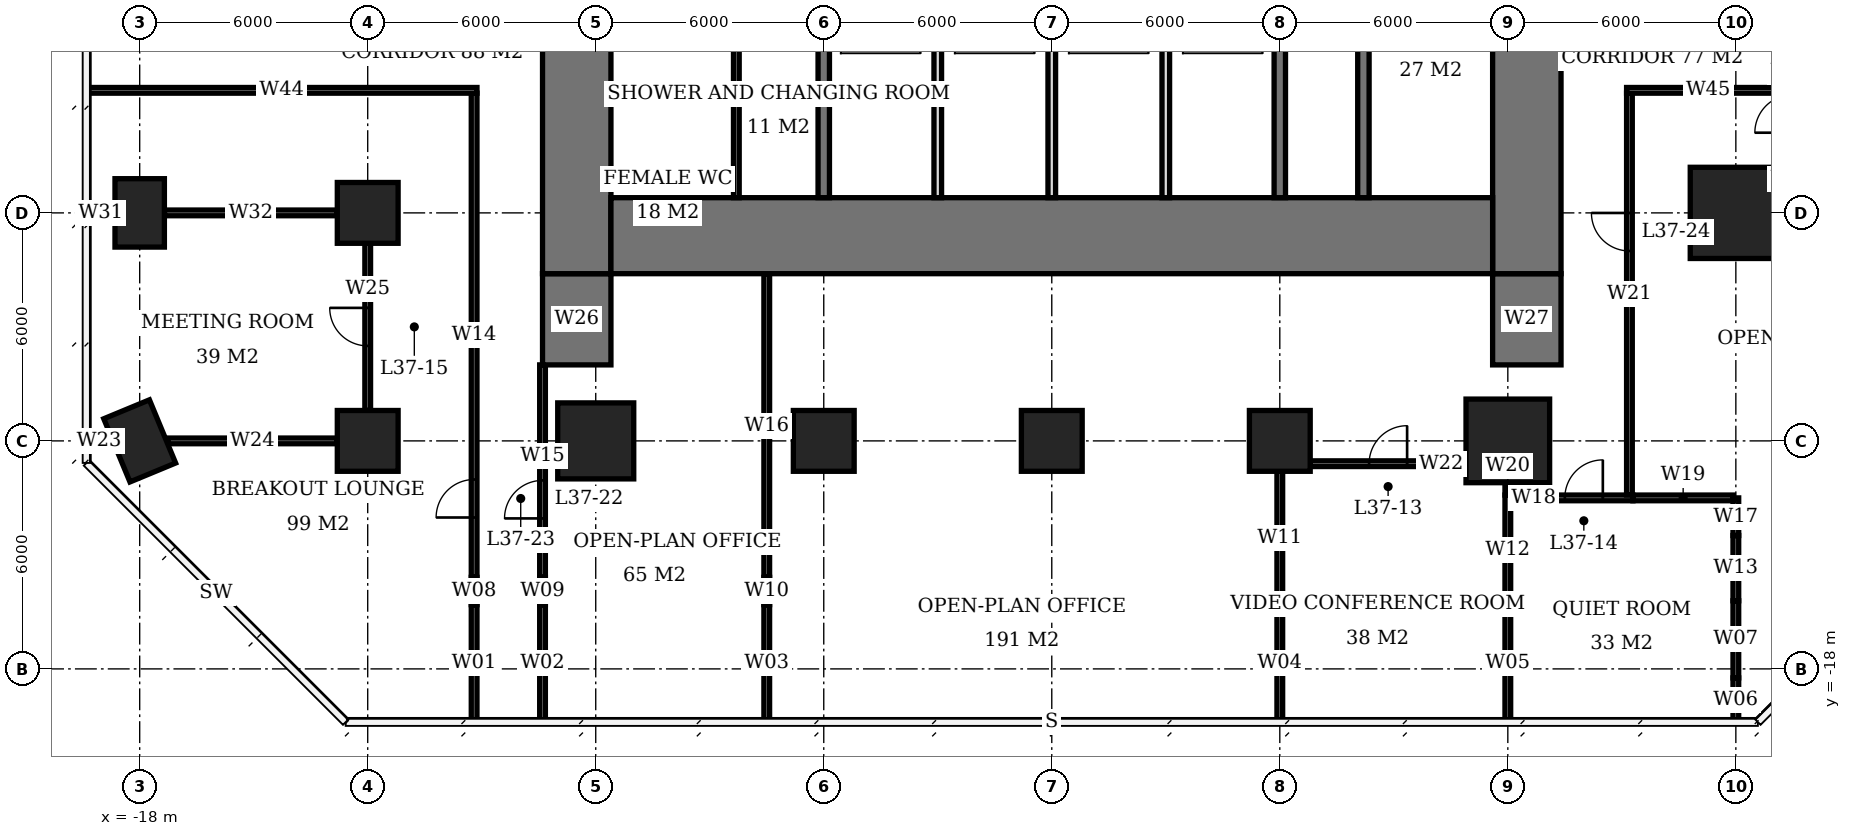
"""IFC4 building model, lengths in metres.
Left out: names, types, materials, properties, quantities, classifications, styles, units other than length and angle.
Written with IfcOpenShell. Run it as: python <this file> out.ifc"""

import sys

from ifc_helpers import new_model, si_unit, direction, frame, frame_2d, origin, origin_2d, place, context, subcontext, project, spatial, rectangle, extrude, element, fill, save


model = new_model("IFC4")
c1 = context("Model", 3, precision=1e-05, world=origin(), true_north=direction((0.0, 1.0)))
c2 = subcontext(c1, "Body", "Model", "MODEL_VIEW")
j1 = project(units=[si_unit("LENGTHUNIT", "METRE"), si_unit("PLANEANGLEUNIT", "RADIAN")], contexts=[c1])
p1 = place(None, origin())
s1 = spatial("IfcSite", under=j1, at=p1, CompositionType="ELEMENT")
p2 = place(p1, origin())
s2 = spatial("IfcBuilding", under=s1, at=p2, CompositionType="ELEMENT")
p3 = place(p2, frame((0.0, 0.0, 152.3)))
s3 = spatial("IfcBuildingStorey", under=s2, at=p3, CompositionType="ELEMENT", Elevation=152.3)
for number, where, z_axis, x_axis in (
    (1, (-18.0, -12.0, 0.0), (0.0, 0.0, 1.0), (-0.383, 0.924, 0.0)),
    (2, (-18.0, -6.0, 0.0), (0.0, 0.0, 1.0), (0.0, 1.0, 0.0)),
):
    element("IfcColumn", number, at=place(p3, frame(where, z_axis=z_axis, x_axis=x_axis)), inside=s3, PredefinedType="COLUMN", context=c2, shape_type="SweptSolid", body=[
        extrude(rectangle(XDim=1.8, YDim=1.3, at=origin_2d()), origin(), (0.0, 0.0, 1.0), 3.9),
    ])
for number, where, z_axis, x_axis in (
    (3, (-12.0, -12.0, 0.0), (0.0, 0.0, 1.0), (1.0, 0.0, 0.0)),
    (4, (-12.0, -6.0, 0.0), (0.0, 0.0, 1.0), (1.0, 0.0, 0.0)),
):
    element("IfcColumn", number, at=place(p3, frame(where, z_axis=z_axis, x_axis=x_axis)), inside=s3, PredefinedType="COLUMN", context=c2, shape_type="SweptSolid", body=[
        extrude(rectangle(XDim=1.6, YDim=1.6, at=origin_2d()), origin(), (0.0, 0.0, 1.0), 3.9),
    ])
p4 = place(p3, frame((-6.0, -12.0, 0.0), z_axis=(0.0, 0.0, 1.0), x_axis=(1.0, 0.0, 0.0)))
e5 = element("IfcColumn", 5, at=p4, inside=s3, PredefinedType="COLUMN", context=c2, shape_type="SweptSolid", body=[
    extrude(rectangle(XDim=2.0, YDim=2.0, at=origin_2d()), origin(), (0.0, 0.0, 1.0), 3.9),
])
for number, where, z_axis, x_axis in (
    (6, (0.0, -12.0, 0.0), (0.0, 0.0, 1.0), (1.0, 0.0, 0.0)),
    (7, (6.0, -12.0, 0.0), (0.0, 0.0, 1.0), (1.0, 0.0, 0.0)),
    (8, (12.0, -12.0, 0.0), (0.0, 0.0, 1.0), (1.0, 0.0, 0.0)),
):
    element("IfcColumn", number, at=place(p3, frame(where, z_axis=z_axis, x_axis=x_axis)), inside=s3, PredefinedType="COLUMN", context=c2, shape_type="SweptSolid", body=[
        extrude(rectangle(XDim=1.6, YDim=1.6, at=origin_2d()), origin(), (0.0, 0.0, 1.0), 3.9),
    ])
p5 = place(p3, frame((18.0, -12.0, 0.0), z_axis=(0.0, 0.0, 1.0), x_axis=(1.0, 0.0, 0.0)))
e9 = element("IfcColumn", 9, at=p5, inside=s3, PredefinedType="COLUMN", context=c2, shape_type="SweptSolid", body=[
    extrude(rectangle(XDim=2.2, YDim=2.2, at=origin_2d()), origin(), (0.0, 0.0, 1.0), 3.9),
])
p6 = place(p3, frame((24.0, -6.0, 0.0), z_axis=(0.0, 0.0, 1.0), x_axis=(1.0, 0.0, 0.0)))
e10 = element("IfcColumn", 10, at=p6, inside=s3, PredefinedType="COLUMN", context=c2, shape_type="SweptSolid", body=[
    extrude(rectangle(XDim=2.4, YDim=2.4, at=origin_2d()), origin(), (0.0, 0.0, 1.0), 3.9),
])
p7 = place(p3, frame((-5.6, -6.6, 0.0), z_axis=(0.0, 0.0, 1.0), x_axis=(1.0, 0.0, 0.0)))
e11 = element("IfcWall", 11, at=p7, inside=s3, PredefinedType="SHEAR", context=c2, shape_type="SweptSolid", body=[
    extrude(rectangle(XDim=23.2, YDim=2.0, at=frame_2d((11.6, 0.0))), origin(), (0.0, 0.0, 1.0), 3.9),
])
p8 = place(p3, frame((-6.5, -7.6, 0.0), z_axis=(0.0, 0.0, 1.0), x_axis=(0.0, 1.0, 0.0)))
e12 = element("IfcWall", 12, at=p8, inside=s3, PredefinedType="SHEAR", context=c2, shape_type="SweptSolid", body=[
    extrude(rectangle(XDim=21.2, YDim=1.8, at=frame_2d((10.6, 0.0))), origin(), (0.0, 0.0, 1.0), 3.9),
])
p9 = place(p8, frame((7.8, 0.0, 0.0)))
e13 = element("IfcOpeningElement", 13, at=p9, cuts=e12, PredefinedType="OPENING", context=c2, shape_type="SweptSolid", body=[
    extrude(rectangle(XDim=1.8, YDim=2.4, at=frame_2d((0.9, 1.2))), frame((0.0, 0.91, 0.0), z_axis=(0.0, -1.0, 0.0), x_axis=(1.0, 0.0, 0.0)), (0.0, 0.0, 1.0), 1.82),
])
p10 = place(p3, frame((18.5, -7.6, 0.0), z_axis=(0.0, 0.0, 1.0), x_axis=(0.0, 1.0, 0.0)))
e14 = element("IfcWall", 14, at=p10, inside=s3, PredefinedType="SHEAR", context=c2, shape_type="SweptSolid", body=[
    extrude(rectangle(XDim=21.2, YDim=1.8, at=frame_2d((10.6, 0.0))), origin(), (0.0, 0.0, 1.0), 3.9),
])
p11 = place(p10, frame((9.2, 0.0, 0.0)))
e15 = element("IfcOpeningElement", 15, at=p11, cuts=e14, PredefinedType="OPENING", context=c2, shape_type="SweptSolid", body=[
    extrude(rectangle(XDim=1.8, YDim=2.4, at=frame_2d((0.9, 1.2))), frame((0.0, 0.91, 0.0), z_axis=(0.0, -1.0, 0.0), x_axis=(1.0, 0.0, 0.0)), (0.0, 0.0, 1.0), 1.82),
])
for number, where, z_axis, x_axis in (
    (16, (-6.5, -10.0, 0.0), (0.0, 0.0, 1.0), (0.0, 1.0, 0.0)),
    (17, (18.5, -10.0, 0.0), (0.0, 0.0, 1.0), (0.0, 1.0, 0.0)),
):
    element("IfcWall", number, at=place(p3, frame(where, z_axis=z_axis, x_axis=x_axis)), inside=s3, PredefinedType="SHEAR", context=c2, shape_type="SweptSolid", body=[
        extrude(rectangle(XDim=2.4, YDim=1.8, at=frame_2d((1.2, 0.0))), origin(), (0.0, 0.0, 1.0), 3.9),
    ])
for number, where, z_axis, x_axis in (
    (18, (0.0, -5.6, 0.0), (0.0, 0.0, 1.0), (0.0, 1.0, 0.0)),
    (19, (12.0, -5.6, 0.0), (0.0, 0.0, 1.0), (0.0, 1.0, 0.0)),
):
    element("IfcWall", number, at=place(p3, frame(where, z_axis=z_axis, x_axis=x_axis)), inside=s3, PredefinedType="SHEAR", context=c2, shape_type="SweptSolid", body=[
        extrude(rectangle(XDim=5.45, YDim=0.3, at=frame_2d((2.725, 0.0))), origin(), (0.0, 0.0, 1.0), 3.9),
    ])
p12 = place(p3, frame((14.2, -5.6, 0.0), z_axis=(0.0, 0.0, 1.0), x_axis=(0.0, 1.0, 0.0)))
e20 = element("IfcWall", 20, at=p12, inside=s3, PredefinedType="SHEAR", context=c2, shape_type="SweptSolid", body=[
    extrude(rectangle(XDim=8.45, YDim=0.3, at=frame_2d((4.225, 0.0))), origin(), (0.0, 0.0, 1.0), 3.9),
])
for number, where, z_axis, x_axis in (
    (21, (3.0, -5.6, 0.0), (0.0, 0.0, 1.0), (0.0, 1.0, 0.0)),
    (22, (6.0, -5.6, 0.0), (0.0, 0.0, 1.0), (0.0, 1.0, 0.0)),
    (23, (9.0, -5.6, 0.0), (0.0, 0.0, 1.0), (0.0, 1.0, 0.0)),
):
    element("IfcWall", number, at=place(p3, frame(where, z_axis=z_axis, x_axis=x_axis)), inside=s3, PredefinedType="SOLIDWALL", context=c2, shape_type="SweptSolid", body=[
        extrude(rectangle(XDim=5.45, YDim=0.2, at=frame_2d((2.725, 0.0))), origin(), (0.0, 0.0, 1.0), 3.9),
    ])
p13 = place(p3, frame((-2.3, -5.6, 0.0), z_axis=(0.0, 0.0, 1.0), x_axis=(0.0, 1.0, 0.0)))
e24 = element("IfcWall", 24, at=p13, inside=s3, PredefinedType="PLUMBINGWALL", context=c2, shape_type="SweptSolid", body=[
    extrude(rectangle(XDim=5.45, YDim=0.15, at=frame_2d((2.725, 0.0))), origin(), (0.0, 0.0, 1.0), 3.65),
])
p14 = place(p3, frame((18.075, -13.5, 0.0), z_axis=(0.0, 0.0, 1.0), x_axis=(1.0, 0.0, 0.0)))
e25 = element("IfcWall", 25, at=p14, inside=s3, PredefinedType="PARTITIONING", context=c2, shape_type="SweptSolid", body=[
    extrude(rectangle(XDim=3.217, YDim=0.15, at=frame_2d((1.608, 0.0))), origin(), (0.0, 0.0, 1.0), 2.65),
])
p15 = place(p14, frame((1.425, 0.0, 0.0)))
e26 = element("IfcOpeningElement", 26, at=p15, cuts=e25, PredefinedType="OPENING", context=c2, shape_type="SweptSolid", body=[
    extrude(rectangle(XDim=1.0, YDim=2.1, at=frame_2d((0.5, 1.05))), frame((0.0, 0.085, 0.0), z_axis=(0.0, -1.0, 0.0), x_axis=(1.0, 0.0, 0.0)), (0.0, 0.0, 1.0), 0.17),
])
p16 = place(p3, frame((21.292, -13.5, 0.0), z_axis=(0.0, 0.0, 1.0), x_axis=(1.0, 0.0, 0.0)))
e27 = element("IfcWall", 27, at=p16, inside=s3, PredefinedType="PARTITIONING", context=c2, shape_type="SweptSolid", body=[
    extrude(rectangle(XDim=2.643, YDim=0.15, at=frame_2d((1.322, 0.0))), origin(), (0.0, 0.0, 1.0), 3.65),
])
p17 = place(p3, frame((12.8, -12.6, 0.0), z_axis=(0.0, 0.0, 1.0), x_axis=(1.0, 0.0, 0.0)))
e28 = element("IfcWall", 28, at=p17, inside=s3, PredefinedType="PARTITIONING", context=c2, shape_type="SweptSolid", body=[
    extrude(rectangle(XDim=4.1, YDim=0.15, at=frame_2d((2.05, 0.0))), origin(), (0.0, 0.0, 1.0), 3.65),
])
p18 = place(p17, frame((1.55, 0.0, 0.0)))
e29 = element("IfcOpeningElement", 29, at=p18, cuts=e28, PredefinedType="OPENING", context=c2, shape_type="SweptSolid", body=[
    extrude(rectangle(XDim=1.0, YDim=2.1, at=frame_2d((0.5, 1.05))), frame((0.0, 0.085, 0.0), z_axis=(0.0, -1.0, 0.0), x_axis=(1.0, 0.0, 0.0)), (0.0, 0.0, 1.0), 0.17),
])
p19 = place(p3, frame((-19.4, -12.0, 0.0), z_axis=(0.0, 0.0, 1.0), x_axis=(1.0, 0.0, 0.0)))
e30 = element("IfcWall", 30, at=p19, inside=s3, PredefinedType="PARTITIONING", context=c2, shape_type="SweptSolid", body=[
    extrude(rectangle(XDim=0.665, YDim=0.15, at=frame_2d((0.333, 0.0))), origin(), (0.0, 0.0, 1.0), 3.65),
])
p20 = place(p3, frame((-17.265, -12.0, 0.0), z_axis=(0.0, 0.0, 1.0), x_axis=(1.0, 0.0, 0.0)))
e31 = element("IfcWall", 31, at=p20, inside=s3, PredefinedType="PARTITIONING", context=c2, shape_type="SweptSolid", body=[
    extrude(rectangle(XDim=4.465, YDim=0.15, at=frame_2d((2.233, 0.0))), origin(), (0.0, 0.0, 1.0), 3.65),
])
p21 = place(p3, frame((-19.4, -6.0, 0.0), z_axis=(0.0, 0.0, 1.0), x_axis=(1.0, 0.0, 0.0)))
e32 = element("IfcWall", 32, at=p21, inside=s3, PredefinedType="PARTITIONING", context=c2, shape_type="SweptSolid", body=[
    extrude(rectangle(XDim=0.75, YDim=0.15, at=frame_2d((0.375, 0.0))), origin(), (0.0, 0.0, 1.0), 3.65),
])
p22 = place(p3, frame((-17.35, -6.0, 0.0), z_axis=(0.0, 0.0, 1.0), x_axis=(1.0, 0.0, 0.0)))
e33 = element("IfcWall", 33, at=p22, inside=s3, PredefinedType="PARTITIONING", context=c2, shape_type="SweptSolid", body=[
    extrude(rectangle(XDim=4.55, YDim=0.15, at=frame_2d((2.275, 0.0))), origin(), (0.0, 0.0, 1.0), 3.65),
])
p23 = place(p3, frame((-12.0, -11.2, 0.0), z_axis=(0.0, 0.0, 1.0), x_axis=(0.0, 1.0, 0.0)))
e34 = element("IfcWall", 34, at=p23, inside=s3, PredefinedType="PARTITIONING", context=c2, shape_type="SweptSolid", body=[
    extrude(rectangle(XDim=4.4, YDim=0.15, at=frame_2d((2.2, 0.0))), origin(), (0.0, 0.0, 1.0), 3.65),
])
p24 = place(p23, frame((1.7, 0.0, 0.0)))
e35 = element("IfcOpeningElement", 35, at=p24, cuts=e34, PredefinedType="OPENING", context=c2, shape_type="SweptSolid", body=[
    extrude(rectangle(XDim=1.0, YDim=2.1, at=frame_2d((0.5, 1.05))), frame((0.0, 0.085, 0.0), z_axis=(0.0, -1.0, 0.0), x_axis=(1.0, 0.0, 0.0)), (0.0, 0.0, 1.0), 0.17),
])
p25 = place(p3, frame((12.0, -19.4, 0.0), z_axis=(0.0, 0.0, 1.0), x_axis=(0.0, 1.0, 0.0)))
e36 = element("IfcWall", 36, at=p25, inside=s3, PredefinedType="PARTITIONING", context=c2, shape_type="SweptSolid", body=[
    extrude(rectangle(XDim=3.09, YDim=0.15, at=frame_2d((1.545, 0.0))), origin(), (0.0, 0.0, 1.0), 3.65),
])
p26 = place(p3, frame((12.0, -16.31, 0.0), z_axis=(0.0, 0.0, 1.0), x_axis=(0.0, 1.0, 0.0)))
e37 = element("IfcWall", 37, at=p26, inside=s3, PredefinedType="PARTITIONING", context=c2, shape_type="SweptSolid", body=[
    extrude(rectangle(XDim=3.51, YDim=0.15, at=frame_2d((1.755, 0.0))), origin(), (0.0, 0.0, 1.0), 2.65),
])
p27 = place(p3, frame((18.0, -19.4, 0.0), z_axis=(0.0, 0.0, 1.0), x_axis=(0.0, 1.0, 0.0)))
e38 = element("IfcWall", 38, at=p27, inside=s3, PredefinedType="PARTITIONING", context=c2, shape_type="SweptSolid", body=[
    extrude(rectangle(XDim=3.09, YDim=0.15, at=frame_2d((1.545, 0.0))), origin(), (0.0, 0.0, 1.0), 3.65),
])
p28 = place(p3, frame((18.0, -16.31, 0.0), z_axis=(0.0, 0.0, 1.0), x_axis=(0.0, 1.0, 0.0)))
e39 = element("IfcWall", 39, at=p28, inside=s3, PredefinedType="PARTITIONING", context=c2, shape_type="SweptSolid", body=[
    extrude(rectangle(XDim=2.885, YDim=0.15, at=frame_2d((1.442, 0.0))), origin(), (0.0, 0.0, 1.0), 2.65),
])
p29 = place(p3, frame((18.0, -13.425, 0.0), z_axis=(0.0, 0.0, 1.0), x_axis=(0.0, 1.0, 0.0)))
e40 = element("IfcWall", 40, at=p29, inside=s3, PredefinedType="PARTITIONING", context=c2, shape_type="SweptSolid", body=[
    extrude(rectangle(XDim=0.325, YDim=0.15, at=frame_2d((0.163, 0.0))), origin(), (0.0, 0.0, 1.0), 2.65),
])
p30 = place(p3, frame((24.0, -19.4, 0.0), z_axis=(0.0, 0.0, 1.0), x_axis=(0.0, 1.0, 0.0)))
e41 = element("IfcWall", 41, at=p30, inside=s3, PredefinedType="PARTITIONING", context=c2, shape_type="SweptSolid", body=[
    extrude(rectangle(XDim=1.163, YDim=0.15, at=frame_2d((0.582, 0.0))), origin(), (0.0, 0.0, 1.0), 3.65),
])
p31 = place(p3, frame((24.0, -18.237, 0.0), z_axis=(0.0, 0.0, 1.0), x_axis=(0.0, 1.0, 0.0)))
e42 = element("IfcWall", 42, at=p31, inside=s3, PredefinedType="PARTITIONING", context=c2, shape_type="SweptSolid", body=[
    extrude(rectangle(XDim=2.029, YDim=0.15, at=frame_2d((1.015, 0.0))), origin(), (0.0, 0.0, 1.0), 2.65),
])
p32 = place(p3, frame((24.0, -16.208, 0.0), z_axis=(0.0, 0.0, 1.0), x_axis=(0.0, 1.0, 0.0)))
e43 = element("IfcWall", 43, at=p32, inside=s3, PredefinedType="PARTITIONING", context=c2, shape_type="SweptSolid", body=[
    extrude(rectangle(XDim=1.718, YDim=0.15, at=frame_2d((0.859, 0.0))), origin(), (0.0, 0.0, 1.0), 3.65),
])
p33 = place(p3, frame((24.0, -14.49, 0.0), z_axis=(0.0, 0.0, 1.0), x_axis=(0.0, 1.0, 0.0)))
e44 = element("IfcWall", 44, at=p33, inside=s3, PredefinedType="PARTITIONING", context=c2, shape_type="SweptSolid", body=[
    extrude(rectangle(XDim=0.99, YDim=0.15, at=frame_2d((0.495, 0.0))), origin(), (0.0, 0.0, 1.0), 2.65),
])
p34 = place(p3, frame((-19.4, -2.775, 0.0), z_axis=(0.0, 0.0, 1.0), x_axis=(1.0, 0.0, 0.0)))
e45 = element("IfcWall", 45, at=p34, inside=s3, PredefinedType="PARTITIONING", context=c2, shape_type="SweptSolid", body=[
    extrude(rectangle(XDim=10.275, YDim=0.15, at=frame_2d((5.137, 0.0))), origin(), (0.0, 0.0, 1.0), 3.65),
])
p35 = place(p3, frame((-9.2, -19.4, 0.0), z_axis=(0.0, 0.0, 1.0), x_axis=(0.0, 1.0, 0.0)))
e46 = element("IfcWall", 46, at=p35, inside=s3, PredefinedType="PARTITIONING", context=c2, shape_type="SweptSolid", body=[
    extrude(rectangle(XDim=3.09, YDim=0.15, at=frame_2d((1.545, 0.0))), origin(), (0.0, 0.0, 1.0), 3.65),
])
p36 = place(p3, frame((-9.2, -16.31, 0.0), z_axis=(0.0, 0.0, 1.0), x_axis=(0.0, 1.0, 0.0)))
e47 = element("IfcWall", 47, at=p36, inside=s3, PredefinedType="PARTITIONING", context=c2, shape_type="SweptSolid", body=[
    extrude(rectangle(XDim=0.72, YDim=0.15, at=frame_2d((0.36, 0.0))), origin(), (0.0, 0.0, 1.0), 2.65),
])
p37 = place(p3, frame((-9.2, -15.59, 0.0), z_axis=(0.0, 0.0, 1.0), x_axis=(0.0, 1.0, 0.0)))
e48 = element("IfcWall", 48, at=p37, inside=s3, PredefinedType="PARTITIONING", context=c2, shape_type="SweptSolid", body=[
    extrude(rectangle(XDim=12.74, YDim=0.15, at=frame_2d((6.37, 0.0))), origin(), (0.0, 0.0, 1.0), 3.65),
])
p38 = place(p37, frame((1.574, 0.0, 0.0)))
e49 = element("IfcOpeningElement", 49, at=p38, cuts=e48, PredefinedType="OPENING", context=c2, shape_type="SweptSolid", body=[
    extrude(rectangle(XDim=1.0, YDim=2.1, at=frame_2d((0.5, 1.05))), frame((0.0, 0.085, 0.0), z_axis=(0.0, -1.0, 0.0), x_axis=(1.0, 0.0, 0.0)), (0.0, 0.0, 1.0), 0.17),
])
p39 = place(p3, frame((-7.4, -19.4, 0.0), z_axis=(0.0, 0.0, 1.0), x_axis=(0.0, 1.0, 0.0)))
e50 = element("IfcWall", 50, at=p39, inside=s3, PredefinedType="PARTITIONING", context=c2, shape_type="SweptSolid", body=[
    extrude(rectangle(XDim=3.09, YDim=0.15, at=frame_2d((1.545, 0.0))), origin(), (0.0, 0.0, 1.0), 3.65),
])
p40 = place(p3, frame((-7.4, -16.31, 0.0), z_axis=(0.0, 0.0, 1.0), x_axis=(0.0, 1.0, 0.0)))
e51 = element("IfcWall", 51, at=p40, inside=s3, PredefinedType="PARTITIONING", context=c2, shape_type="SweptSolid", body=[
    extrude(rectangle(XDim=0.72, YDim=0.15, at=frame_2d((0.36, 0.0))), origin(), (0.0, 0.0, 1.0), 2.65),
])
p41 = place(p3, frame((-7.4, -15.59, 0.0), z_axis=(0.0, 0.0, 1.0), x_axis=(0.0, 1.0, 0.0)))
e52 = element("IfcWall", 52, at=p41, inside=s3, PredefinedType="PARTITIONING", context=c2, shape_type="SweptSolid", body=[
    extrude(rectangle(XDim=5.59, YDim=0.15, at=frame_2d((2.795, 0.0))), origin(), (0.0, 0.0, 1.0), 3.65),
])
p42 = place(p41, frame((1.55, 0.0, 0.0)))
e53 = element("IfcOpeningElement", 53, at=p42, cuts=e52, PredefinedType="OPENING", context=c2, shape_type="SweptSolid", body=[
    extrude(rectangle(XDim=1.0, YDim=2.1, at=frame_2d((0.5, 1.05))), frame((0.0, 0.085, 0.0), z_axis=(0.0, -1.0, 0.0), x_axis=(1.0, 0.0, 0.0)), (0.0, 0.0, 1.0), 0.17),
])
p43 = place(p3, frame((-1.5, -19.4, 0.0), z_axis=(0.0, 0.0, 1.0), x_axis=(0.0, 1.0, 0.0)))
e54 = element("IfcWall", 54, at=p43, inside=s3, PredefinedType="PARTITIONING", context=c2, shape_type="SweptSolid", body=[
    extrude(rectangle(XDim=3.09, YDim=0.15, at=frame_2d((1.545, 0.0))), origin(), (0.0, 0.0, 1.0), 3.65),
])
p44 = place(p3, frame((-1.5, -16.31, 0.0), z_axis=(0.0, 0.0, 1.0), x_axis=(0.0, 1.0, 0.0)))
e55 = element("IfcWall", 55, at=p44, inside=s3, PredefinedType="PARTITIONING", context=c2, shape_type="SweptSolid", body=[
    extrude(rectangle(XDim=0.72, YDim=0.15, at=frame_2d((0.36, 0.0))), origin(), (0.0, 0.0, 1.0), 2.65),
])
p45 = place(p3, frame((-1.5, -15.59, 0.0), z_axis=(0.0, 0.0, 1.0), x_axis=(0.0, 1.0, 0.0)))
e56 = element("IfcWall", 56, at=p45, inside=s3, PredefinedType="PARTITIONING", context=c2, shape_type="SweptSolid", body=[
    extrude(rectangle(XDim=7.99, YDim=0.15, at=frame_2d((3.995, 0.0))), origin(), (0.0, 0.0, 1.0), 3.65),
])
p46 = place(p3, frame((21.2, -13.425, 0.0), z_axis=(0.0, 0.0, 1.0), x_axis=(0.0, 1.0, 0.0)))
e57 = element("IfcWall", 57, at=p46, inside=s3, PredefinedType="PARTITIONING", context=c2, shape_type="SweptSolid", body=[
    extrude(rectangle(XDim=10.575, YDim=0.15, at=frame_2d((5.288, 0.0))), origin(), (0.0, 0.0, 1.0), 3.65),
])
p47 = place(p46, frame((6.423, 0.0, 0.0)))
e58 = element("IfcOpeningElement", 58, at=p47, cuts=e57, PredefinedType="OPENING", context=c2, shape_type="SweptSolid", body=[
    extrude(rectangle(XDim=1.0, YDim=2.1, at=frame_2d((0.5, 1.05))), frame((0.0, 0.085, 0.0), z_axis=(0.0, -1.0, 0.0), x_axis=(1.0, 0.0, 0.0)), (0.0, 0.0, 1.0), 0.17),
])
p48 = place(p3, frame((21.125, -2.775, 0.0), z_axis=(0.0, 0.0, 1.0), x_axis=(1.0, 0.0, 0.0)))
e59 = element("IfcWall", 59, at=p48, inside=s3, PredefinedType="PARTITIONING", context=c2, shape_type="SweptSolid", body=[
    extrude(rectangle(XDim=4.3, YDim=0.15, at=frame_2d((2.15, 0.0))), origin(), (0.0, 0.0, 1.0), 3.65),
])
p49 = place(p18, origin())
e60 = element("IfcDoor", 60, at=p49, inside=s3, OperationType="SINGLE_SWING_RIGHT", PredefinedType="DOOR", context=c2, shape_type="SweptSolid", body=[
    extrude(rectangle(XDim=1.0, YDim=2.1, at=frame_2d((0.5, 1.05))), frame((0.0, 0.025, 0.0), z_axis=(0.0, -1.0, 0.0), x_axis=(1.0, 0.0, 0.0)), (0.0, 0.0, 1.0), 0.05),
])
fill(e29, e60)
p50 = place(p15, origin())
e61 = element("IfcDoor", 61, at=p50, inside=s3, OperationType="SINGLE_SWING_RIGHT", PredefinedType="DOOR", context=c2, shape_type="SweptSolid", body=[
    extrude(rectangle(XDim=1.0, YDim=2.1, at=frame_2d((0.5, 1.05))), frame((0.0, 0.025, 0.0), z_axis=(0.0, -1.0, 0.0), x_axis=(1.0, 0.0, 0.0)), (0.0, 0.0, 1.0), 0.05),
])
fill(e26, e61)
p51 = place(p24, origin())
e62 = element("IfcDoor", 62, at=p51, inside=s3, OperationType="SINGLE_SWING_RIGHT", PredefinedType="DOOR", context=c2, shape_type="SweptSolid", body=[
    extrude(rectangle(XDim=1.0, YDim=2.1, at=frame_2d((0.5, 1.05))), frame((0.0, 0.025, 0.0), z_axis=(0.0, -1.0, 0.0), x_axis=(1.0, 0.0, 0.0)), (0.0, 0.0, 1.0), 0.05),
])
fill(e35, e62)
p52 = place(p42, origin())
e63 = element("IfcDoor", 63, at=p52, inside=s3, OperationType="SINGLE_SWING_LEFT", PredefinedType="DOOR", context=c2, shape_type="SweptSolid", body=[
    extrude(rectangle(XDim=1.0, YDim=2.1, at=frame_2d((0.5, 1.05))), frame((0.0, 0.025, 0.0), z_axis=(0.0, -1.0, 0.0), x_axis=(1.0, 0.0, 0.0)), (0.0, 0.0, 1.0), 0.05),
])
fill(e53, e63)
p53 = place(p38, origin())
e64 = element("IfcDoor", 64, at=p53, inside=s3, OperationType="SINGLE_SWING_LEFT", PredefinedType="DOOR", context=c2, shape_type="SweptSolid", body=[
    extrude(rectangle(XDim=1.0, YDim=2.1, at=frame_2d((0.5, 1.05))), frame((0.0, 0.025, 0.0), z_axis=(0.0, -1.0, 0.0), x_axis=(1.0, 0.0, 0.0)), (0.0, 0.0, 1.0), 0.05),
])
fill(e49, e64)
p54 = place(p47, origin())
e65 = element("IfcDoor", 65, at=p54, inside=s3, OperationType="SINGLE_SWING_RIGHT", PredefinedType="DOOR", context=c2, shape_type="SweptSolid", body=[
    extrude(rectangle(XDim=1.0, YDim=2.1, at=frame_2d((0.5, 1.05))), frame((0.0, 0.025, 0.0), z_axis=(0.0, -1.0, 0.0), x_axis=(1.0, 0.0, 0.0)), (0.0, 0.0, 1.0), 0.05),
])
fill(e58, e65)
save(model, sys.argv[1])
